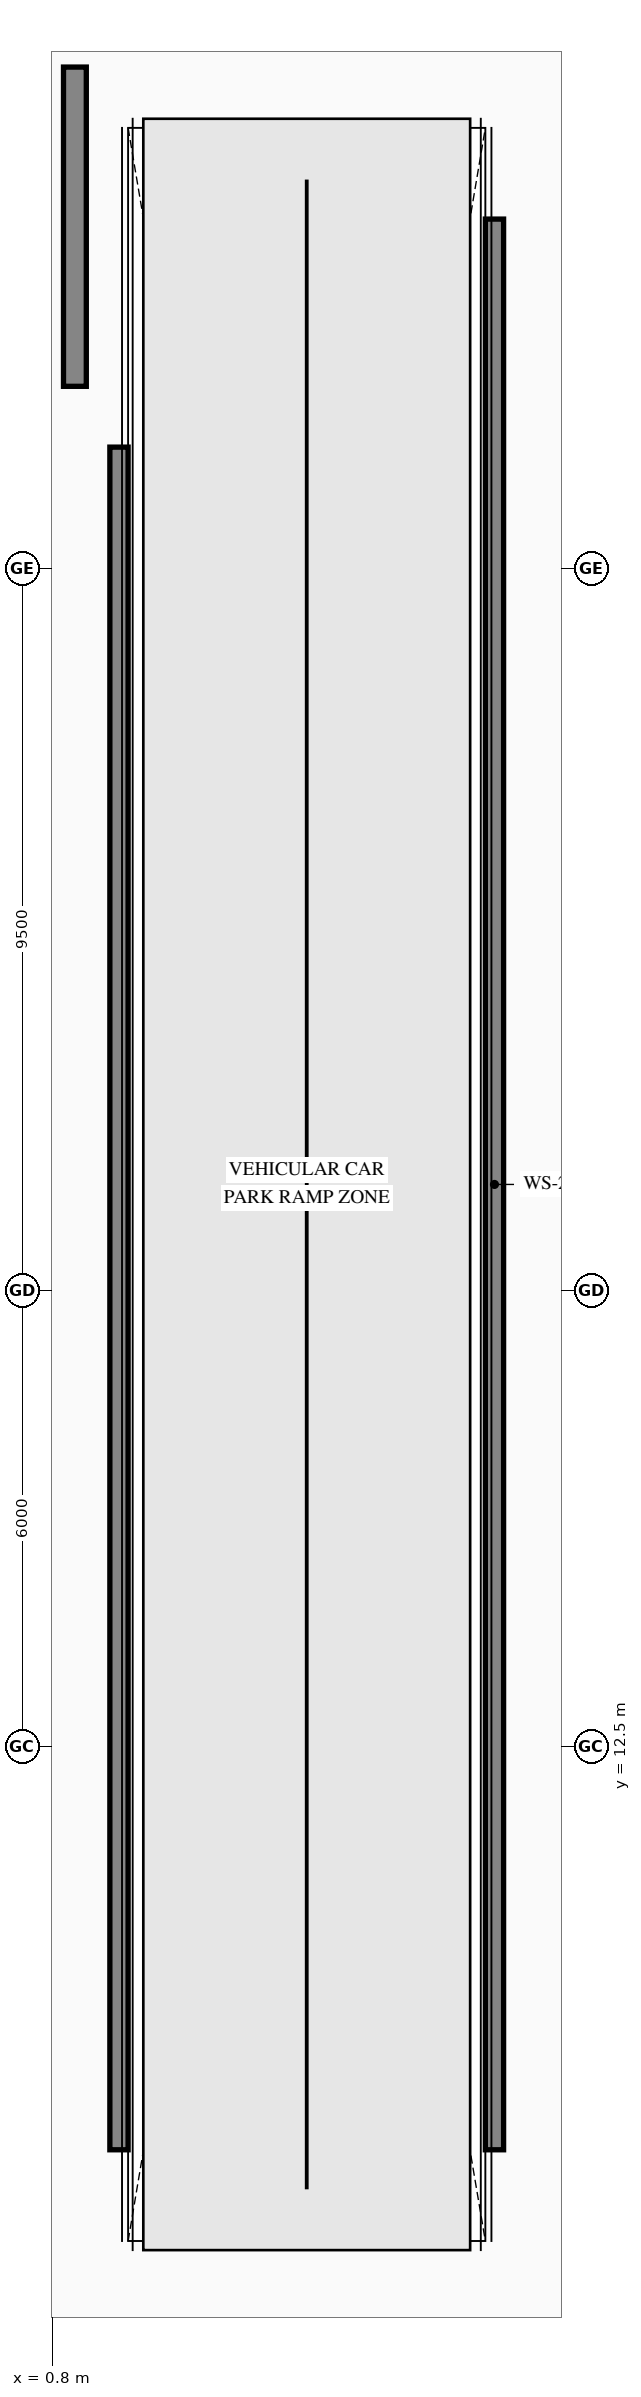
"""IFC4 building model, lengths in metres.
Left out: names, types, materials, properties, quantities, classifications, styles, units other than length and angle.
Written with IfcOpenShell. Run it as: python <this file> out.ifc"""

import sys

from ifc_helpers import new_model, si_unit, direction, frame, frame_2d, origin, place, context, subcontext, project, spatial, rectangle, extrude, element, save


model = new_model("IFC4")
c1 = context("Model", 3, precision=1e-05, world=origin(), true_north=direction((0.0, 1.0)))
c2 = subcontext(c1, "Body", "Model", "MODEL_VIEW")
j1 = project(units=[si_unit("LENGTHUNIT", "METRE"), si_unit("PLANEANGLEUNIT", "RADIAN")], contexts=[c1])
p1 = place(None, origin())
s1 = spatial("IfcSite", under=j1, at=p1, CompositionType="ELEMENT")
p2 = place(p1, origin())
s2 = spatial("IfcBuilding", under=s1, at=p2, CompositionType="ELEMENT")
p3 = place(p2, frame((0.0, 0.0, -4.6)))
s3 = spatial("IfcBuildingStorey", under=s2, at=p3, CompositionType="ELEMENT", Elevation=-4.6)
p4 = place(p3, frame((1.68, 7.2, 0.0), z_axis=(0.0, 0.0, 1.0), x_axis=(0.0, 1.0, 0.0)))
e1 = element("IfcWall", 1, at=p4, inside=s3, PredefinedType="SOLIDWALL", context=c2, shape_type="SweptSolid", body=[
    extrude(rectangle(XDim=22.4, YDim=0.24, at=frame_2d((11.2, 0.0))), origin(), (0.0, 0.0, 1.0), 4.18),
])
p5 = place(p3, frame((6.62, 7.2, 0.0), z_axis=(0.0, 0.0, 1.0), x_axis=(0.0, 1.0, 0.0)))
e2 = element("IfcWall", 2, at=p5, inside=s3, PredefinedType="SOLIDWALL", context=c2, shape_type="SweptSolid", body=[
    extrude(rectangle(XDim=25.4, YDim=0.24, at=frame_2d((12.7, 0.0))), origin(), (0.0, 0.0, 1.0), 4.18),
])
p6 = place(p3, frame((1.1, 30.4, 0.0), z_axis=(0.0, 0.0, 1.0), x_axis=(0.0, 1.0, 0.0)))
e3 = element("IfcWall", 3, at=p6, inside=s3, PredefinedType="SOLIDWALL", context=c2, shape_type="SweptSolid", body=[
    extrude(rectangle(XDim=4.2, YDim=0.3, at=frame_2d((2.1, 0.0))), origin(), (0.0, 0.0, 1.0), 4.35),
])
save(model, sys.argv[1])
